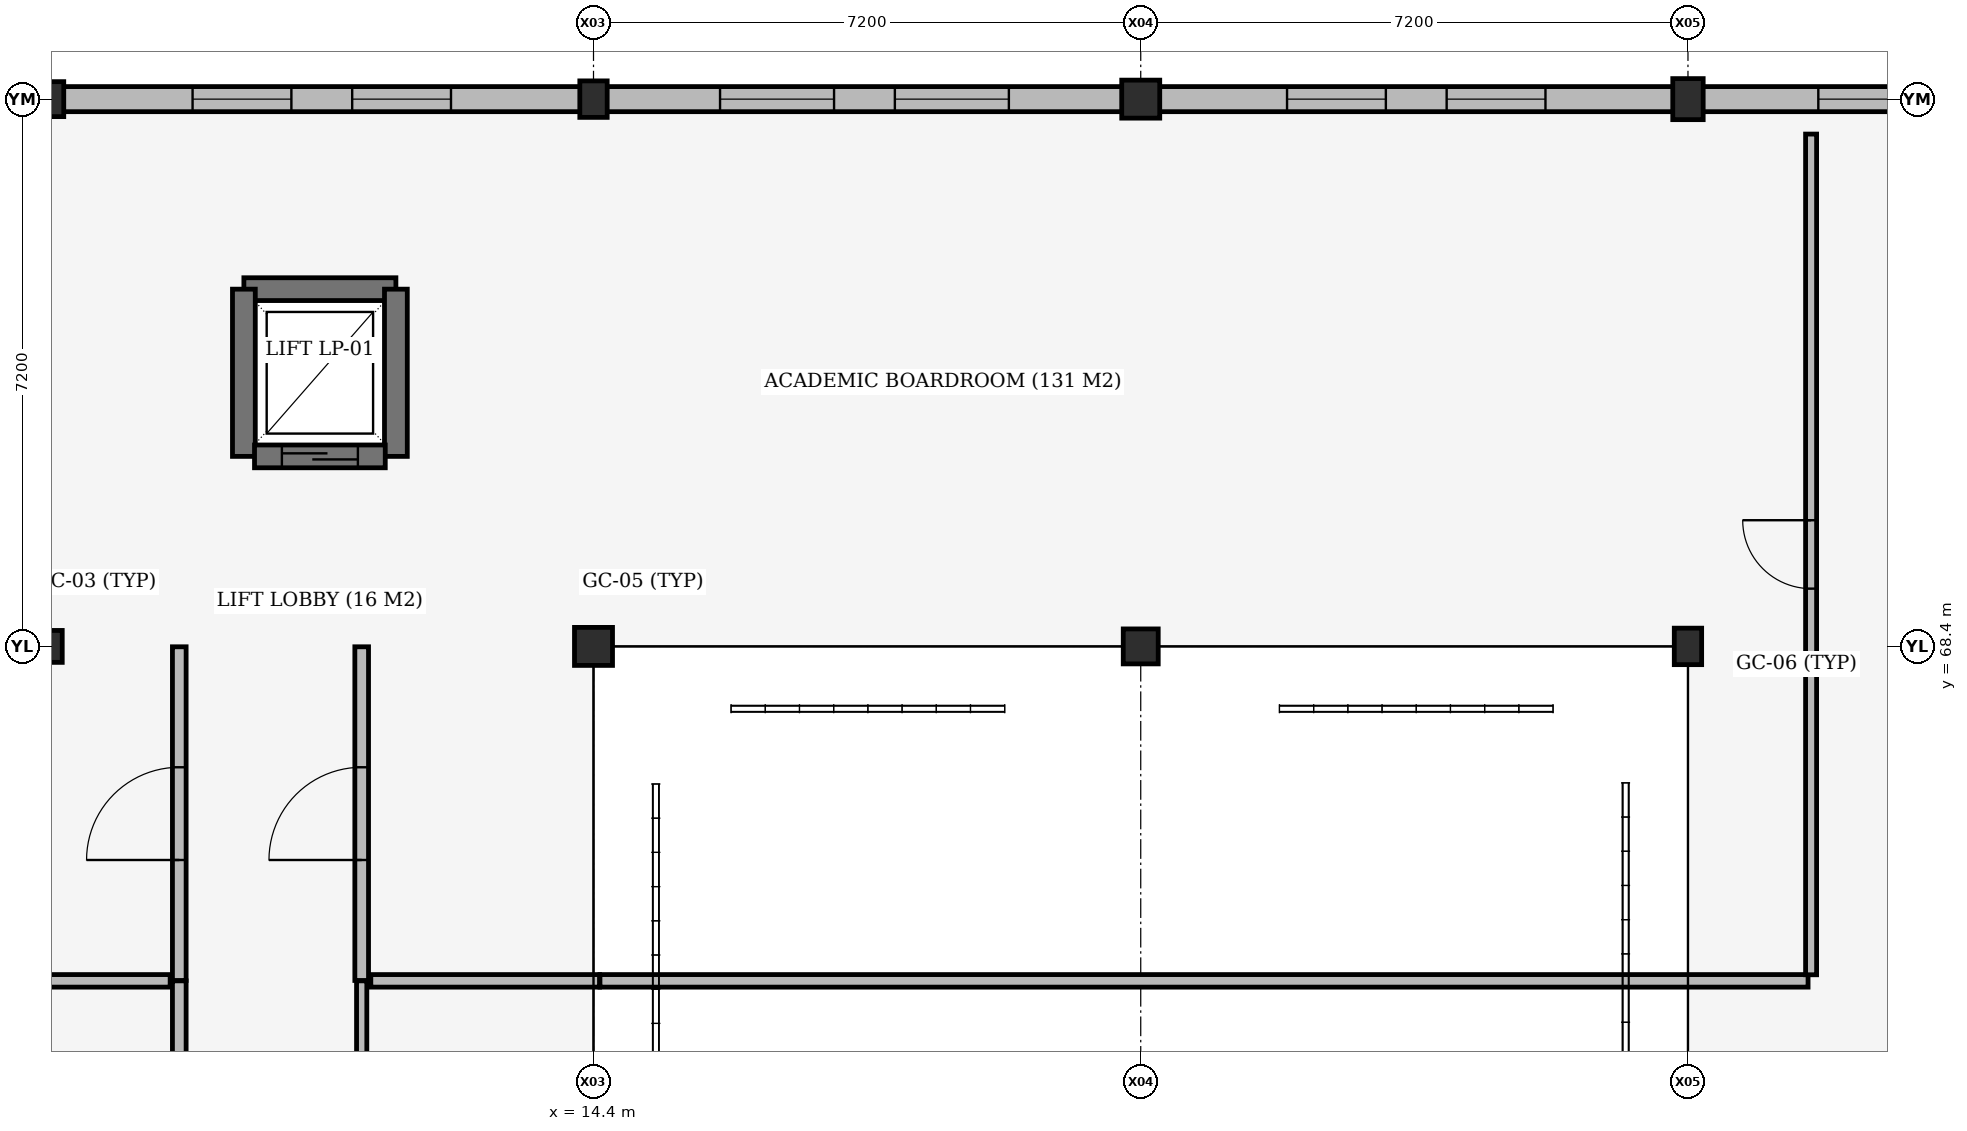
"""IFC4 building model, lengths in metres.
Left out: names, types, materials, properties, quantities, classifications, styles, units other than length and angle.
Written with IfcOpenShell. Run it as: python <this file> out.ifc"""

import sys

from ifc_helpers import new_model, si_unit, direction, frame, frame_2d, origin, origin_2d, place, context, subcontext, project, spatial, rectangle, extrude, element, fill, save


model = new_model("IFC4")
c1 = context("Model", 3, precision=1e-05, world=origin(), true_north=direction((0.0, 1.0)))
c2 = subcontext(c1, "Body", "Model", "MODEL_VIEW")
j1 = project(units=[si_unit("LENGTHUNIT", "METRE"), si_unit("PLANEANGLEUNIT", "RADIAN")], contexts=[c1])
p1 = place(None, origin())
s1 = spatial("IfcSite", under=j1, at=p1, CompositionType="ELEMENT")
p2 = place(p1, origin())
s2 = spatial("IfcBuilding", under=s1, at=p2, CompositionType="ELEMENT")
p3 = place(p2, frame((0.0, 0.0, 18.0)))
s3 = spatial("IfcBuildingStorey", under=s2, at=p3, CompositionType="ELEMENT", Elevation=18.0)
p4 = place(p3, frame((7.2, 68.4, 0.0), z_axis=(0.0, 0.0, 1.0), x_axis=(1.0, 0.0, 0.0)))
e1 = element("IfcColumn", 1, at=p4, inside=s3, PredefinedType="COLUMN", context=c2, shape_type="SweptSolid", body=[
    extrude(rectangle(XDim=0.42, YDim=0.42, at=origin_2d()), origin(), (0.0, 0.0, 1.0), 3.96),
])
p5 = place(p3, frame((7.2, 75.6, 0.0), z_axis=(0.0, 0.0, 1.0), x_axis=(1.0, 0.0, 0.0)))
e2 = element("IfcColumn", 2, at=p5, inside=s3, PredefinedType="COLUMN", context=c2, shape_type="SweptSolid", body=[
    extrude(rectangle(XDim=0.46, YDim=0.46, at=origin_2d()), origin(), (0.0, 0.0, 1.0), 3.96),
])
p6 = place(p3, frame((14.4, 68.4, 0.0), z_axis=(0.0, 0.0, 1.0), x_axis=(1.0, 0.0, 0.0)))
e3 = element("IfcColumn", 3, at=p6, inside=s3, PredefinedType="COLUMN", context=c2, shape_type="SweptSolid", body=[
    extrude(rectangle(XDim=0.5, YDim=0.5, at=origin_2d()), origin(), (0.0, 0.0, 1.0), 3.96),
])
p7 = place(p3, frame((14.4, 75.6, 0.0), z_axis=(0.0, 0.0, 1.0), x_axis=(1.0, 0.0, 0.0)))
e4 = element("IfcColumn", 4, at=p7, inside=s3, PredefinedType="COLUMN", context=c2, shape_type="SweptSolid", body=[
    extrude(rectangle(XDim=0.36, YDim=0.48, at=origin_2d()), origin(), (0.0, 0.0, 1.0), 3.96),
])
p8 = place(p3, frame((21.6, 68.4, 0.0), z_axis=(0.0, 0.0, 1.0), x_axis=(1.0, 0.0, 0.0)))
e5 = element("IfcColumn", 5, at=p8, inside=s3, PredefinedType="COLUMN", context=c2, shape_type="SweptSolid", body=[
    extrude(rectangle(XDim=0.46, YDim=0.46, at=origin_2d()), origin(), (0.0, 0.0, 1.0), 3.96),
])
p9 = place(p3, frame((21.6, 75.6, 0.0), z_axis=(0.0, 0.0, 1.0), x_axis=(1.0, 0.0, 0.0)))
e6 = element("IfcColumn", 6, at=p9, inside=s3, PredefinedType="COLUMN", context=c2, shape_type="SweptSolid", body=[
    extrude(rectangle(XDim=0.5, YDim=0.5, at=origin_2d()), origin(), (0.0, 0.0, 1.0), 3.96),
])
p10 = place(p3, frame((28.8, 68.4, 0.0), z_axis=(0.0, 0.0, 1.0), x_axis=(1.0, 0.0, 0.0)))
e7 = element("IfcColumn", 7, at=p10, inside=s3, PredefinedType="COLUMN", context=c2, shape_type="SweptSolid", body=[
    extrude(rectangle(XDim=0.36, YDim=0.48, at=origin_2d()), origin(), (0.0, 0.0, 1.0), 3.96),
])
p11 = place(p3, frame((28.8, 75.6, 0.0), z_axis=(0.0, 0.0, 1.0), x_axis=(1.0, 0.0, 0.0)))
e8 = element("IfcColumn", 8, at=p11, inside=s3, PredefinedType="COLUMN", context=c2, shape_type="SweptSolid", body=[
    extrude(rectangle(XDim=0.4, YDim=0.54, at=origin_2d()), origin(), (0.0, 0.0, 1.0), 3.96),
])
p12 = place(p3, frame((11.8, 73.1, 0.0), z_axis=(0.0, 0.0, 1.0), x_axis=(-1.0, 0.0, 0.0)))
e9 = element("IfcWall", 9, at=p12, inside=s3, PredefinedType="SHEAR", context=c2, shape_type="SweptSolid", body=[
    extrude(rectangle(XDim=2.0, YDim=0.3, at=frame_2d((1.0, 0.0))), origin(), (0.0, 0.0, 1.0), 4.86),
])
for number, where, z_axis, x_axis in (
    (10, (9.8, 73.1, 0.0), (0.0, 0.0, 1.0), (0.0, -1.0, 0.0)),
    (11, (11.8, 70.9, 0.0), (0.0, 0.0, 1.0), (0.0, 1.0, 0.0)),
):
    element("IfcWall", number, at=place(p3, frame(where, z_axis=z_axis, x_axis=x_axis)), inside=s3, PredefinedType="SHEAR", context=c2, shape_type="SweptSolid", body=[
        extrude(rectangle(XDim=2.2, YDim=0.3, at=frame_2d((1.1, 0.0))), origin(), (0.0, 0.0, 1.0), 4.86),
    ])
p13 = place(p3, frame((7.422, 75.6, 0.0), z_axis=(0.0, 0.0, 1.0), x_axis=(1.0, 0.0, 0.0)))
e12 = element("IfcWall", 12, at=p13, inside=s3, PredefinedType="STANDARD", context=c2, shape_type="SweptSolid", body=[
    extrude(rectangle(XDim=6.806, YDim=0.33, at=frame_2d((3.403, 0.0))), origin(), (0.0, 0.0, 1.0), 3.935),
])
p14 = place(p13, frame((1.703, 0.0, 0.95)))
e13 = element("IfcOpeningElement", 13, at=p14, cuts=e12, PredefinedType="OPENING", context=c2, shape_type="SweptSolid", body=[
    extrude(rectangle(XDim=1.3, YDim=1.8, at=frame_2d((0.65, 0.9))), frame((0.0, 0.175, 0.0), z_axis=(0.0, -1.0, 0.0), x_axis=(1.0, 0.0, 0.0)), (0.0, 0.0, 1.0), 0.35),
])
p15 = place(p13, frame((3.803, 0.0, 0.95)))
e14 = element("IfcOpeningElement", 14, at=p15, cuts=e12, PredefinedType="OPENING", context=c2, shape_type="SweptSolid", body=[
    extrude(rectangle(XDim=1.3, YDim=1.8, at=frame_2d((0.65, 0.9))), frame((0.0, 0.175, 0.0), z_axis=(0.0, -1.0, 0.0), x_axis=(1.0, 0.0, 0.0)), (0.0, 0.0, 1.0), 0.35),
])
p16 = place(p3, frame((14.572, 75.6, 0.0), z_axis=(0.0, 0.0, 1.0), x_axis=(1.0, 0.0, 0.0)))
e15 = element("IfcWall", 15, at=p16, inside=s3, PredefinedType="STANDARD", context=c2, shape_type="SweptSolid", body=[
    extrude(rectangle(XDim=6.786, YDim=0.33, at=frame_2d((3.393, 0.0))), origin(), (0.0, 0.0, 1.0), 3.935),
])
p17 = place(p16, frame((1.493, 0.0, 0.95)))
e16 = element("IfcOpeningElement", 16, at=p17, cuts=e15, PredefinedType="OPENING", context=c2, shape_type="SweptSolid", body=[
    extrude(rectangle(XDim=1.5, YDim=1.8, at=frame_2d((0.75, 0.9))), frame((0.0, 0.175, 0.0), z_axis=(0.0, -1.0, 0.0), x_axis=(1.0, 0.0, 0.0)), (0.0, 0.0, 1.0), 0.35),
])
p18 = place(p16, frame((3.793, 0.0, 0.95)))
e17 = element("IfcOpeningElement", 17, at=p18, cuts=e15, PredefinedType="OPENING", context=c2, shape_type="SweptSolid", body=[
    extrude(rectangle(XDim=1.5, YDim=1.8, at=frame_2d((0.75, 0.9))), frame((0.0, 0.175, 0.0), z_axis=(0.0, -1.0, 0.0), x_axis=(1.0, 0.0, 0.0)), (0.0, 0.0, 1.0), 0.35),
])
p19 = place(p3, frame((21.842, 75.6, 0.0), z_axis=(0.0, 0.0, 1.0), x_axis=(1.0, 0.0, 0.0)))
e18 = element("IfcWall", 18, at=p19, inside=s3, PredefinedType="STANDARD", context=c2, shape_type="SweptSolid", body=[
    extrude(rectangle(XDim=6.766, YDim=0.33, at=frame_2d((3.383, 0.0))), origin(), (0.0, 0.0, 1.0), 3.935),
])
p20 = place(p19, frame((1.683, 0.0, 0.95)))
e19 = element("IfcOpeningElement", 19, at=p20, cuts=e18, PredefinedType="OPENING", context=c2, shape_type="SweptSolid", body=[
    extrude(rectangle(XDim=1.3, YDim=1.8, at=frame_2d((0.65, 0.9))), frame((0.0, 0.175, 0.0), z_axis=(0.0, -1.0, 0.0), x_axis=(1.0, 0.0, 0.0)), (0.0, 0.0, 1.0), 0.35),
])
p21 = place(p19, frame((3.783, 0.0, 0.95)))
e20 = element("IfcOpeningElement", 20, at=p21, cuts=e18, PredefinedType="OPENING", context=c2, shape_type="SweptSolid", body=[
    extrude(rectangle(XDim=1.3, YDim=1.8, at=frame_2d((0.65, 0.9))), frame((0.0, 0.175, 0.0), z_axis=(0.0, -1.0, 0.0), x_axis=(1.0, 0.0, 0.0)), (0.0, 0.0, 1.0), 0.35),
])
p22 = place(p3, frame((28.992, 75.6, 0.0), z_axis=(0.0, 0.0, 1.0), x_axis=(1.0, 0.0, 0.0)))
e21 = element("IfcWall", 21, at=p22, inside=s3, PredefinedType="STANDARD", context=c2, shape_type="SweptSolid", body=[
    extrude(rectangle(XDim=6.846, YDim=0.33, at=frame_2d((3.423, 0.0))), origin(), (0.0, 0.0, 1.0), 3.935),
])
p23 = place(p22, frame((1.523, 0.0, 0.95)))
e22 = element("IfcOpeningElement", 22, at=p23, cuts=e21, PredefinedType="OPENING", context=c2, shape_type="SweptSolid", body=[
    extrude(rectangle(XDim=1.5, YDim=1.8, at=frame_2d((0.75, 0.9))), frame((0.0, 0.175, 0.0), z_axis=(0.0, -1.0, 0.0), x_axis=(1.0, 0.0, 0.0)), (0.0, 0.0, 1.0), 0.35),
])
p24 = place(p22, frame((3.823, 0.0, 0.95)))
e23 = element("IfcOpeningElement", 23, at=p24, cuts=e21, PredefinedType="OPENING", context=c2, shape_type="SweptSolid", body=[
    extrude(rectangle(XDim=1.5, YDim=1.8, at=frame_2d((0.75, 0.9))), frame((0.0, 0.175, 0.0), z_axis=(0.0, -1.0, 0.0), x_axis=(1.0, 0.0, 0.0)), (0.0, 0.0, 1.0), 0.35),
])
p25 = place(p3, frame((11.66, 70.9, 0.0), z_axis=(0.0, 0.0, 1.0), x_axis=(-1.0, 0.0, 0.0)))
e24 = element("IfcWall", 24, at=p25, inside=s3, PredefinedType="SHEAR", context=c2, shape_type="SweptSolid", body=[
    extrude(rectangle(XDim=1.72, YDim=0.3, at=frame_2d((0.86, 0.0))), origin(), (0.0, 0.0, 1.0), 5.1),
])
p26 = place(p25, frame((0.36, 0.0, 0.0)))
e25 = element("IfcOpeningElement", 25, at=p26, cuts=e24, PredefinedType="OPENING", context=c2, shape_type="SweptSolid", body=[
    extrude(rectangle(XDim=1.0, YDim=2.1, at=frame_2d((0.5, 1.05))), frame((0.0, 0.16, 0.0), z_axis=(0.0, -1.0, 0.0), x_axis=(1.0, 0.0, 0.0)), (0.0, 0.0, 1.0), 0.32),
])
p27 = place(p3, frame((8.95, 54.965, 0.0), z_axis=(0.0, 0.0, 1.0), x_axis=(0.0, 1.0, 0.0)))
e26 = element("IfcWall", 26, at=p27, inside=s3, PredefinedType="PARTITIONING", context=c2, shape_type="SweptSolid", body=[
    extrude(rectangle(XDim=9.035, YDim=0.18, at=frame_2d((4.518, 0.0))), origin(), (0.0, 0.0, 1.0), 3.195),
])
p28 = place(p27, frame((3.897, 0.0, 0.0)))
e27 = element("IfcOpeningElement", 27, at=p28, cuts=e26, PredefinedType="OPENING", context=c2, shape_type="SweptSolid", body=[
    extrude(rectangle(XDim=1.24, YDim=2.25, at=frame_2d((0.62, 1.125))), frame((0.0, 0.1, 0.0), z_axis=(0.0, -1.0, 0.0), x_axis=(1.0, 0.0, 0.0)), (0.0, 0.0, 1.0), 0.2),
])
p29 = place(p3, frame((0.25, 64.0, 0.0), z_axis=(0.0, 0.0, 1.0), x_axis=(1.0, 0.0, 0.0)))
e28 = element("IfcWall", 28, at=p29, inside=s3, PredefinedType="PARTITIONING", context=c2, shape_type="SweptSolid", body=[
    extrude(rectangle(XDim=8.58, YDim=0.165, at=frame_2d((4.29, 0.0))), origin(), (0.0, 0.0, 1.0), 3.935),
])
p30 = place(p3, frame((8.95, 64.005, 0.0), z_axis=(0.0, 0.0, 1.0), x_axis=(0.0, 1.0, 0.0)))
e29 = element("IfcWall", 29, at=p30, inside=s3, PredefinedType="PARTITIONING", context=c2, shape_type="SweptSolid", body=[
    extrude(rectangle(XDim=4.39, YDim=0.18, at=frame_2d((2.195, 0.0))), origin(), (0.0, 0.0, 1.0), 3.935),
])
p31 = place(p30, frame((1.585, 0.0, 0.0)))
e30 = element("IfcOpeningElement", 30, at=p31, cuts=e29, PredefinedType="OPENING", context=c2, shape_type="SweptSolid", body=[
    extrude(rectangle(XDim=1.22, YDim=2.25, at=frame_2d((0.61, 1.125))), frame((0.0, 0.1, 0.0), z_axis=(0.0, -1.0, 0.0), x_axis=(1.0, 0.0, 0.0)), (0.0, 0.0, 1.0), 0.2),
])
p32 = place(p3, frame((11.35, 54.965, 0.0), z_axis=(0.0, 0.0, 1.0), x_axis=(0.0, 1.0, 0.0)))
e31 = element("IfcWall", 31, at=p32, inside=s3, PredefinedType="PARTITIONING", context=c2, shape_type="SweptSolid", body=[
    extrude(rectangle(XDim=9.035, YDim=0.135, at=frame_2d((4.518, 0.0))), origin(), (0.0, 0.0, 1.0), 3.195),
])
p33 = place(p32, frame((3.938, 0.0, 0.0)))
e32 = element("IfcOpeningElement", 32, at=p33, cuts=e31, PredefinedType="OPENING", context=c2, shape_type="SweptSolid", body=[
    extrude(rectangle(XDim=1.16, YDim=2.2, at=frame_2d((0.58, 1.1))), frame((0.0, 0.077, 0.0), z_axis=(0.0, -1.0, 0.0), x_axis=(1.0, 0.0, 0.0)), (0.0, 0.0, 1.0), 0.155),
])
p34 = place(p3, frame((11.47, 64.0, 0.0), z_axis=(0.0, 0.0, 1.0), x_axis=(1.0, 0.0, 0.0)))
e33 = element("IfcWall", 33, at=p34, inside=s3, PredefinedType="PARTITIONING", context=c2, shape_type="SweptSolid", body=[
    extrude(rectangle(XDim=3.01, YDim=0.165, at=frame_2d((1.505, 0.0))), origin(), (0.0, 0.0, 1.0), 3.935),
])
p35 = place(p3, frame((11.35, 64.005, 0.0), z_axis=(0.0, 0.0, 1.0), x_axis=(0.0, 1.0, 0.0)))
e34 = element("IfcWall", 34, at=p35, inside=s3, PredefinedType="PARTITIONING", context=c2, shape_type="SweptSolid", body=[
    extrude(rectangle(XDim=4.39, YDim=0.18, at=frame_2d((2.195, 0.0))), origin(), (0.0, 0.0, 1.0), 3.935),
])
p36 = place(p35, frame((1.585, 0.0, 0.0)))
e35 = element("IfcOpeningElement", 35, at=p36, cuts=e34, PredefinedType="OPENING", context=c2, shape_type="SweptSolid", body=[
    extrude(rectangle(XDim=1.22, YDim=2.25, at=frame_2d((0.61, 1.125))), frame((0.0, 0.1, 0.0), z_axis=(0.0, -1.0, 0.0), x_axis=(1.0, 0.0, 0.0)), (0.0, 0.0, 1.0), 0.2),
])
p37 = place(p3, frame((14.485, 64.0, 0.0), z_axis=(0.0, 0.0, 1.0), x_axis=(1.0, 0.0, 0.0)))
e36 = element("IfcWall", 36, at=p37, inside=s3, PredefinedType="PARTITIONING", context=c2, shape_type="SweptSolid", body=[
    extrude(rectangle(XDim=15.895, YDim=0.165, at=frame_2d((7.947, 0.0))), origin(), (0.0, 0.0, 1.0), 3.935),
])
p38 = place(p3, frame((30.42, 75.14, 0.0), z_axis=(0.0, 0.0, 1.0), x_axis=(0.0, -1.0, 0.0)))
e37 = element("IfcWall", 37, at=p38, inside=s3, PredefinedType="PLUMBINGWALL", context=c2, shape_type="SweptSolid", body=[
    extrude(rectangle(XDim=11.06, YDim=0.145, at=frame_2d((5.53, 0.0))), origin(), (0.0, 0.0, 1.0), 3.935),
])
p39 = place(p38, frame((5.08, 0.0, 0.0)))
e38 = element("IfcOpeningElement", 38, at=p39, cuts=e37, PredefinedType="OPENING", context=c2, shape_type="SweptSolid", body=[
    extrude(rectangle(XDim=0.9, YDim=2.1, at=frame_2d((0.45, 1.05))), frame((0.0, 0.083, 0.0), z_axis=(0.0, -1.0, 0.0), x_axis=(1.0, 0.0, 0.0)), (0.0, 0.0, 1.0), 0.165),
])
p40 = place(p14, origin())
e39 = element("IfcWindow", 39, at=p40, inside=s3, PartitioningType="DOUBLE_PANEL_VERTICAL", PredefinedType="WINDOW", context=c2, shape_type="SweptSolid", body=[
    extrude(rectangle(XDim=1.3, YDim=1.8, at=frame_2d((0.65, 0.9))), frame((0.0, 0.03, 0.0), z_axis=(0.0, -1.0, 0.0), x_axis=(1.0, 0.0, 0.0)), (0.0, 0.0, 1.0), 0.06),
])
fill(e13, e39)
p41 = place(p15, origin())
e40 = element("IfcWindow", 40, at=p41, inside=s3, PartitioningType="DOUBLE_PANEL_VERTICAL", PredefinedType="WINDOW", context=c2, shape_type="SweptSolid", body=[
    extrude(rectangle(XDim=1.3, YDim=1.8, at=frame_2d((0.65, 0.9))), frame((0.0, 0.03, 0.0), z_axis=(0.0, -1.0, 0.0), x_axis=(1.0, 0.0, 0.0)), (0.0, 0.0, 1.0), 0.06),
])
fill(e14, e40)
p42 = place(p17, origin())
e41 = element("IfcWindow", 41, at=p42, inside=s3, PartitioningType="DOUBLE_PANEL_VERTICAL", PredefinedType="WINDOW", context=c2, shape_type="SweptSolid", body=[
    extrude(rectangle(XDim=1.5, YDim=1.8, at=frame_2d((0.75, 0.9))), frame((0.0, 0.03, 0.0), z_axis=(0.0, -1.0, 0.0), x_axis=(1.0, 0.0, 0.0)), (0.0, 0.0, 1.0), 0.06),
])
fill(e16, e41)
p43 = place(p18, origin())
e42 = element("IfcWindow", 42, at=p43, inside=s3, PartitioningType="DOUBLE_PANEL_VERTICAL", PredefinedType="WINDOW", context=c2, shape_type="SweptSolid", body=[
    extrude(rectangle(XDim=1.5, YDim=1.8, at=frame_2d((0.75, 0.9))), frame((0.0, 0.03, 0.0), z_axis=(0.0, -1.0, 0.0), x_axis=(1.0, 0.0, 0.0)), (0.0, 0.0, 1.0), 0.06),
])
fill(e17, e42)
p44 = place(p20, origin())
e43 = element("IfcWindow", 43, at=p44, inside=s3, PartitioningType="DOUBLE_PANEL_VERTICAL", PredefinedType="WINDOW", context=c2, shape_type="SweptSolid", body=[
    extrude(rectangle(XDim=1.3, YDim=1.8, at=frame_2d((0.65, 0.9))), frame((0.0, 0.03, 0.0), z_axis=(0.0, -1.0, 0.0), x_axis=(1.0, 0.0, 0.0)), (0.0, 0.0, 1.0), 0.06),
])
fill(e19, e43)
p45 = place(p21, origin())
e44 = element("IfcWindow", 44, at=p45, inside=s3, PartitioningType="DOUBLE_PANEL_VERTICAL", PredefinedType="WINDOW", context=c2, shape_type="SweptSolid", body=[
    extrude(rectangle(XDim=1.3, YDim=1.8, at=frame_2d((0.65, 0.9))), frame((0.0, 0.03, 0.0), z_axis=(0.0, -1.0, 0.0), x_axis=(1.0, 0.0, 0.0)), (0.0, 0.0, 1.0), 0.06),
])
fill(e20, e44)
p46 = place(p23, origin())
e45 = element("IfcWindow", 45, at=p46, inside=s3, PartitioningType="DOUBLE_PANEL_VERTICAL", PredefinedType="WINDOW", context=c2, shape_type="SweptSolid", body=[
    extrude(rectangle(XDim=1.5, YDim=1.8, at=frame_2d((0.75, 0.9))), frame((0.0, 0.03, 0.0), z_axis=(0.0, -1.0, 0.0), x_axis=(1.0, 0.0, 0.0)), (0.0, 0.0, 1.0), 0.06),
])
fill(e22, e45)
p47 = place(p26, origin())
e46 = element("IfcDoor", 46, at=p47, inside=s3, OperationType="SLIDING_TO_LEFT", PredefinedType="DOOR", context=c2, shape_type="SweptSolid", body=[
    extrude(rectangle(XDim=1.0, YDim=2.1, at=frame_2d((0.5, 1.05))), frame((0.0, 0.025, 0.0), z_axis=(0.0, -1.0, 0.0), x_axis=(1.0, 0.0, 0.0)), (0.0, 0.0, 1.0), 0.05),
])
fill(e25, e46)
p48 = place(p31, origin())
e47 = element("IfcDoor", 47, at=p48, inside=s3, OperationType="SINGLE_SWING_LEFT", PredefinedType="DOOR", context=c2, shape_type="SweptSolid", body=[
    extrude(rectangle(XDim=1.22, YDim=2.25, at=frame_2d((0.61, 1.125))), frame((0.0, 0.025, 0.0), z_axis=(0.0, -1.0, 0.0), x_axis=(1.0, 0.0, 0.0)), (0.0, 0.0, 1.0), 0.05),
])
fill(e30, e47)
p49 = place(p36, origin())
e48 = element("IfcDoor", 48, at=p49, inside=s3, OperationType="SINGLE_SWING_LEFT", PredefinedType="DOOR", context=c2, shape_type="SweptSolid", body=[
    extrude(rectangle(XDim=1.22, YDim=2.25, at=frame_2d((0.61, 1.125))), frame((0.0, 0.025, 0.0), z_axis=(0.0, -1.0, 0.0), x_axis=(1.0, 0.0, 0.0)), (0.0, 0.0, 1.0), 0.05),
])
fill(e35, e48)
p50 = place(p39, origin())
e49 = element("IfcDoor", 49, at=p50, inside=s3, OperationType="SINGLE_SWING_RIGHT", PredefinedType="DOOR", context=c2, shape_type="SweptSolid", body=[
    extrude(rectangle(XDim=0.9, YDim=2.1, at=frame_2d((0.45, 1.05))), frame((0.0, 0.025, 0.0), z_axis=(0.0, -1.0, 0.0), x_axis=(1.0, 0.0, 0.0)), (0.0, 0.0, 1.0), 0.05),
])
fill(e38, e49)
save(model, sys.argv[1])
